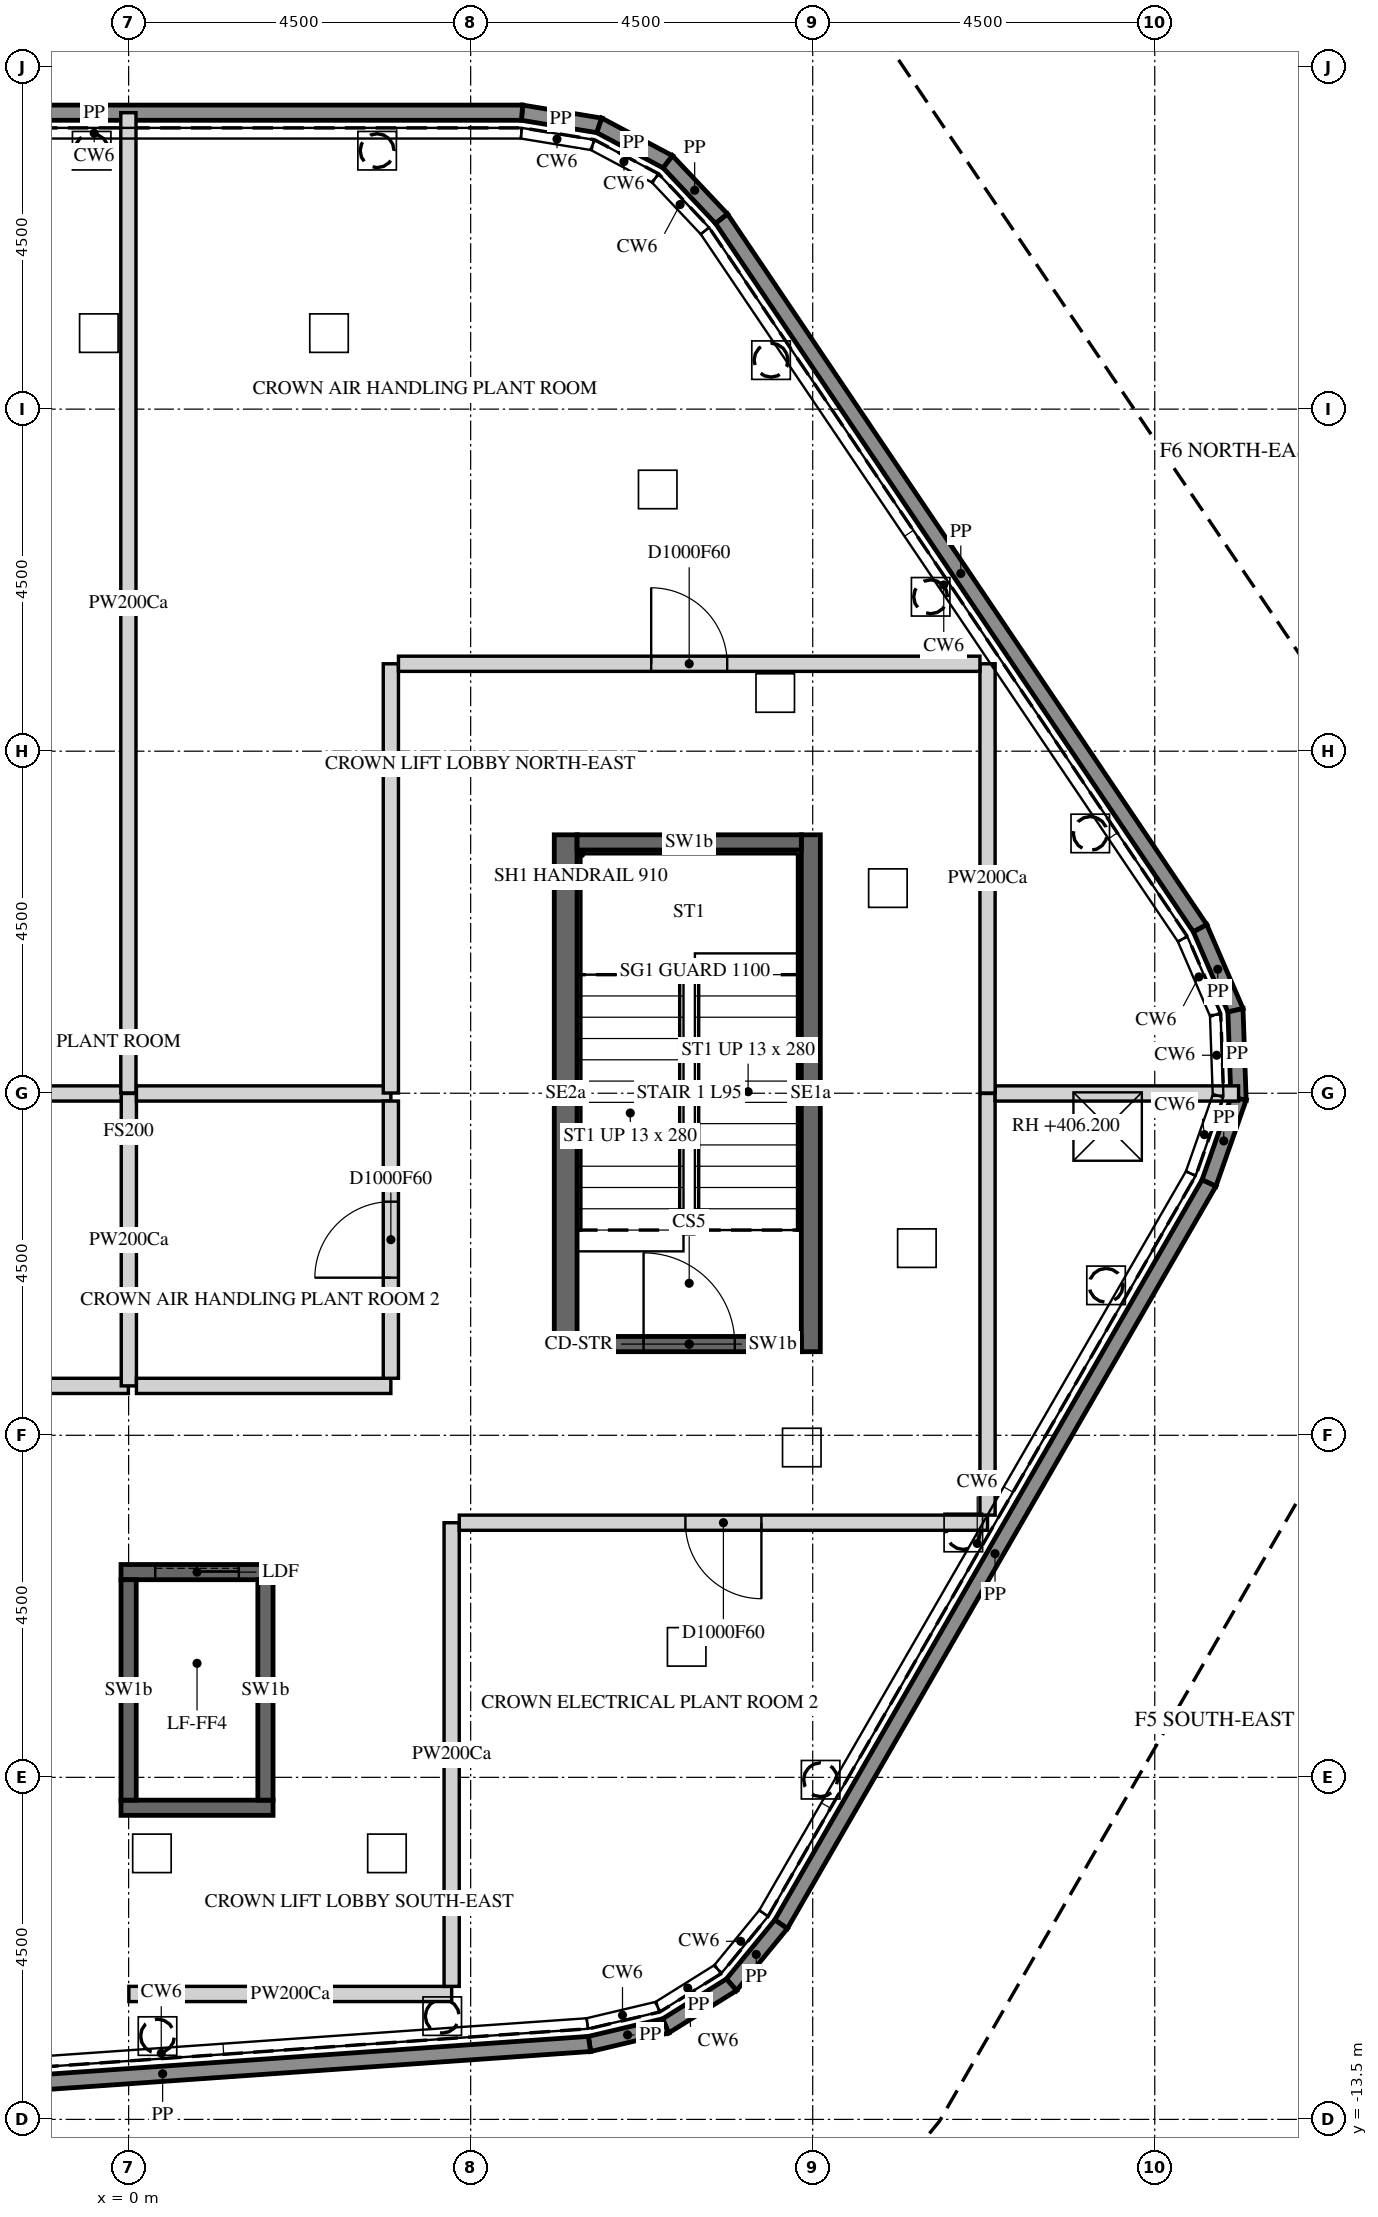
"""IFC4 building model, lengths in metres.
Left out: names, types, materials, properties, quantities, classifications, styles, units other than length and angle.
Written with IfcOpenShell. Run it as: python <this file> out.ifc"""

import sys

from ifc_helpers import new_model, si_unit, direction, frame, frame_2d, origin, origin_2d, place, context, subcontext, project, spatial, polyline, rectangle, outline, extrude, element, fill, save


model = new_model("IFC4")
c1 = context("Model", 3, precision=1e-05, world=origin(), true_north=direction((0.0, 1.0)))
c2 = subcontext(c1, "Body", "Model", "MODEL_VIEW")
j1 = project(units=[si_unit("LENGTHUNIT", "METRE"), si_unit("PLANEANGLEUNIT", "RADIAN")], contexts=[c1])
p1 = place(None, origin())
s1 = spatial("IfcSite", under=j1, at=p1, CompositionType="ELEMENT")
p2 = place(p1, origin())
s2 = spatial("IfcBuilding", under=s1, at=p2, CompositionType="ELEMENT")
p3 = place(p2, frame((0.0, 0.0, 401.7)))
s3 = spatial("IfcBuildingStorey", under=s2, at=p3, CompositionType="ELEMENT", Elevation=401.7)
p4 = place(p3, frame((5.176, 12.9, 4.5), z_axis=(0.0, 0.0, 1.0), x_axis=(0.986756818481, -0.162206600298, 0.0)))
e1 = element("IfcWall", 1, at=p4, inside=s3, PredefinedType="PARAPET", context=c2, shape_type="SweptSolid", body=[
    extrude(outline(polyline([(0.008, -0.1), (1.013, -0.1), (1.046, 0.1), (-0.008, 0.1), (0.008, -0.1)])), origin(), (0.0, 0.0, 1.0), 1.1),
])
p5 = place(p3, frame((6.192, 12.733, 4.5), z_axis=(0.0, 0.0, 1.0), x_axis=(0.883060001067, -0.469260092608, 0.0)))
e2 = element("IfcWall", 2, at=p5, inside=s3, PredefinedType="PARAPET", context=c2, shape_type="SweptSolid", body=[
    extrude(outline(polyline([(0.016, -0.1), (1.005, -0.1), (1.038, 0.1), (-0.016, 0.1), (0.016, -0.1)])), origin(), (0.0, 0.0, 1.0), 1.1),
])
p6 = place(p3, frame((7.094, 12.254, 4.5), z_axis=(0.0, 0.0, 1.0), x_axis=(0.686177819421, -0.727433845882, 0.0)))
e3 = element("IfcWall", 3, at=p6, inside=s3, PredefinedType="PARAPET", context=c2, shape_type="SweptSolid", body=[
    extrude(outline(polyline([(0.016, -0.1), (1.022, -0.1), (1.038, 0.1), (-0.016, 0.1), (0.016, -0.1)])), origin(), (0.0, 0.0, 1.0), 1.1),
])
p7 = place(p3, frame((7.8, 11.505, 4.5), z_axis=(0.0, 0.0, 1.0), x_axis=(0.559185688325, -0.829042439186, 0.0)))
e4 = element("IfcWall", 4, at=p7, inside=s3, PredefinedType="PARAPET", context=c2, shape_type="SweptSolid", body=[
    extrude(outline(polyline([(0.008, -0.1), (11.25, -0.1), (11.268, 0.1), (-0.008, 0.1), (0.008, -0.1)])), origin(), (0.0, 0.0, 1.0), 1.1),
])
p8 = place(p3, frame((14.096, 2.17, 4.5), z_axis=(0.0, 0.0, 1.0), x_axis=(0.396049889586, -0.918228993747, 0.0)))
e5 = element("IfcWall", 5, at=p8, inside=s3, PredefinedType="PARAPET", context=c2, shape_type="SweptSolid", body=[
    extrude(outline(polyline([(0.009, -0.1), (1.156, -0.1), (1.194, 0.1), (-0.009, 0.1), (0.009, -0.1)])), origin(), (0.0, 0.0, 1.0), 1.1),
])
p9 = place(p3, frame((14.562, 1.092, 4.5), z_axis=(0.0, 0.0, 1.0), x_axis=(0.034981720402, -0.999387952318, 0.0)))
e6 = element("IfcWall", 6, at=p9, inside=s3, PredefinedType="PARAPET", context=c2, shape_type="SweptSolid", body=[
    extrude(outline(polyline([(0.019, -0.1), (1.147, -0.1), (1.184, 0.1), (-0.019, 0.1), (0.019, -0.1)])), origin(), (0.0, 0.0, 1.0), 1.1),
])
p10 = place(p3, frame((14.602, -0.073, 4.5), z_axis=(0.0, 0.0, 1.0), x_axis=(-0.331026038484, -0.94362162006, 0.0)))
e7 = element("IfcWall", 7, at=p10, inside=s3, PredefinedType="PARAPET", context=c2, shape_type="SweptSolid", body=[
    extrude(outline(polyline([(0.019, -0.1), (1.166, -0.1), (1.184, 0.1), (-0.019, 0.1), (0.019, -0.1)])), origin(), (0.0, 0.0, 1.0), 1.1),
])
p11 = place(p3, frame((14.213, -1.182, 4.5), z_axis=(0.0, 0.0, 1.0), x_axis=(-0.500003376122, -0.866023454571, 0.0)))
e8 = element("IfcWall", 8, at=p11, inside=s3, PredefinedType="PARAPET", context=c2, shape_type="SweptSolid", body=[
    extrude(outline(polyline([(0.009, -0.1), (11.251, -0.1), (11.267, 0.1), (-0.009, 0.1), (0.009, -0.1)])), origin(), (0.0, 0.0, 1.0), 1.1),
])
p12 = place(p3, frame((8.584, -10.933, 4.5), z_axis=(0.0, 0.0, 1.0), x_axis=(-0.63381867035, -0.773481669541, 0.0)))
e9 = element("IfcWall", 9, at=p12, inside=s3, PredefinedType="PARAPET", context=c2, shape_type="SweptSolid", body=[
    extrude(outline(polyline([(0.008, -0.1), (1.013, -0.1), (1.046, 0.1), (-0.008, 0.1), (0.008, -0.1)])), origin(), (0.0, 0.0, 1.0), 1.1),
])
p13 = place(p3, frame((7.931, -11.729, 4.5), z_axis=(0.0, 0.0, 1.0), x_axis=(-0.84815942401, -0.529741060768, 0.0)))
e10 = element("IfcWall", 10, at=p13, inside=s3, PredefinedType="PARAPET", context=c2, shape_type="SweptSolid", body=[
    extrude(outline(polyline([(0.016, -0.1), (1.005, -0.1), (1.038, 0.1), (-0.016, 0.1), (0.016, -0.1)])), origin(), (0.0, 0.0, 1.0), 1.1),
])
p14 = place(p3, frame((7.065, -12.27, 4.5), z_axis=(0.0, 0.0, 1.0), x_axis=(-0.973014468698, -0.230744108711, 0.0)))
e11 = element("IfcWall", 11, at=p14, inside=s3, PredefinedType="PARAPET", context=c2, shape_type="SweptSolid", body=[
    extrude(outline(polyline([(0.016, -0.1), (1.021, -0.1), (1.038, 0.1), (-0.016, 0.1), (0.016, -0.1)])), origin(), (0.0, 0.0, 1.0), 1.1),
])
p15 = place(p3, frame((6.063, -12.508, 4.5), z_axis=(0.0, 0.0, 1.0), x_axis=(-0.997564024583, -0.069756840932, 0.0)))
e12 = element("IfcWall", 12, at=p15, inside=s3, PredefinedType="PARAPET", context=c2, shape_type="SweptSolid", body=[
    extrude(outline(polyline([(0.008, -0.1), (11.25, -0.1), (11.268, 0.1), (-0.008, 0.1), (0.008, -0.1)])), origin(), (0.0, 0.0, 1.0), 1.1),
])
p16 = place(p3, frame((-6.083, 12.9, 4.5), z_axis=(0.0, 0.0, 1.0), x_axis=(1.0, 0.0, 0.0)))
e13 = element("IfcWall", 13, at=p16, inside=s3, PredefinedType="PARAPET", context=c2, shape_type="SweptSolid", body=[
    extrude(outline(polyline([(0.009, -0.1), (11.251, -0.1), (11.267, 0.1), (-0.009, 0.1), (0.009, -0.1)])), origin(), (0.0, 0.0, 1.0), 1.1),
])
p17 = place(p3, frame((-0.1, -6.3, -0.2), z_axis=(0.0, 0.0, 1.0), x_axis=(1.0, 0.0, 0.0)))
e14 = element("IfcWall", 14, at=p17, inside=s3, PredefinedType="SHEAR", context=c2, shape_type="SweptSolid", body=[
    extrude(rectangle(XDim=2.0, YDim=0.2, at=frame_2d((1.0, 0.0))), origin(), (0.0, 0.0, 1.0), 4.5),
])
p18 = place(p17, frame((0.45, 0.0, 0.2)))
e15 = element("IfcOpeningElement", 15, at=p18, cuts=e14, PredefinedType="OPENING", context=c2, shape_type="SweptSolid", body=[
    extrude(rectangle(XDim=1.1, YDim=2.1, at=frame_2d((0.55, 1.05))), frame((0.0, 0.11, 0.0), z_axis=(0.0, -1.0, 0.0), x_axis=(1.0, 0.0, 0.0)), (0.0, 0.0, 1.0), 0.22),
])
p19 = place(p3, frame((-0.1, -9.4, -0.2), z_axis=(0.0, 0.0, 1.0), x_axis=(1.0, 0.0, 0.0)))
e16 = element("IfcWall", 16, at=p19, inside=s3, PredefinedType="SHEAR", context=c2, shape_type="SweptSolid", body=[
    extrude(rectangle(XDim=2.0, YDim=0.2, at=frame_2d((1.0, 0.0))), origin(), (0.0, 0.0, 1.0), 4.5),
])
for number, where, z_axis, x_axis in (
    (17, (0.0, -9.3, -0.2), (0.0, 0.0, 1.0), (0.0, 1.0, 0.0)),
    (18, (1.8, -9.3, -0.2), (0.0, 0.0, 1.0), (0.0, 1.0, 0.0)),
):
    element("IfcWall", number, at=place(p3, frame(where, z_axis=z_axis, x_axis=x_axis)), inside=s3, PredefinedType="SHEAR", context=c2, shape_type="SweptSolid", body=[
        extrude(rectangle(XDim=2.9, YDim=0.2, at=frame_2d((1.45, 0.0))), origin(), (0.0, 0.0, 1.0), 4.5),
    ])
p20 = place(p3, frame((5.75, -3.4, -0.2), z_axis=(0.0, 0.0, 1.0), x_axis=(0.0, 1.0, 0.0)))
e19 = element("IfcWall", 19, at=p20, inside=s3, PredefinedType="SHEAR", context=c2, shape_type="SweptSolid", body=[
    extrude(rectangle(XDim=6.8, YDim=0.3, at=frame_2d((3.4, 0.0))), origin(), (0.0, 0.0, 1.0), 4.5),
])
p21 = place(p3, frame((8.975, -3.4, -0.2), z_axis=(0.0, 0.0, 1.0), x_axis=(0.0, 1.0, 0.0)))
e20 = element("IfcWall", 20, at=p21, inside=s3, PredefinedType="SHEAR", context=c2, shape_type="SweptSolid", body=[
    extrude(rectangle(XDim=6.8, YDim=0.25, at=frame_2d((3.4, 0.0))), origin(), (0.0, 0.0, 1.0), 4.5),
])
p22 = place(p3, frame((5.9, 3.3, -0.2), z_axis=(0.0, 0.0, 1.0), x_axis=(1.0, 0.0, 0.0)))
e21 = element("IfcWall", 21, at=p22, inside=s3, PredefinedType="SHEAR", context=c2, shape_type="SweptSolid", body=[
    extrude(rectangle(XDim=2.95, YDim=0.2, at=frame_2d((1.475, 0.0))), origin(), (0.0, 0.0, 1.0), 4.5),
])
p23 = place(p3, frame((5.9, -3.3, -0.2), z_axis=(0.0, 0.0, 1.0), x_axis=(1.0, 0.0, 0.0)))
e22 = element("IfcWall", 22, at=p23, inside=s3, PredefinedType="SHEAR", context=c2, shape_type="SweptSolid", body=[
    extrude(rectangle(XDim=2.95, YDim=0.2, at=frame_2d((1.475, 0.0))), origin(), (0.0, 0.0, 1.0), 4.5),
])
p24 = place(p23, frame((0.875, 0.0, 0.2)))
e23 = element("IfcOpeningElement", 23, at=p24, cuts=e22, PredefinedType="OPENING", context=c2, shape_type="SweptSolid", body=[
    extrude(rectangle(XDim=1.2, YDim=2.4, at=frame_2d((0.6, 1.2))), frame((0.0, 0.11, 0.0), z_axis=(0.0, -1.0, 0.0), x_axis=(1.0, 0.0, 0.0)), (0.0, 0.0, 1.0), 0.22),
])
for number, where, z_axis, x_axis in (
    (24, (-3.35, -0.003, 0.0), (0.0, 0.0, 1.0), (1.0, 0.0, 0.0)),
    (25, (-0.003, -3.85, 0.0), (0.0, 0.0, 1.0), (-1.0, 0.0, 0.0)),
):
    element("IfcWall", number, at=place(p3, frame(where, z_axis=z_axis, x_axis=x_axis)), inside=s3, PredefinedType="PARTITIONING", context=c2, shape_type="SweptSolid", body=[
        extrude(rectangle(XDim=3.347, YDim=0.2, at=frame_2d((1.674, 0.0))), origin(), (0.0, 0.0, 1.0), 4.3),
    ])
p25 = place(p3, frame((-0.003, 12.9, 0.0), z_axis=(0.0, 0.0, 1.0), x_axis=(0.0, -1.0, 0.0)))
e26 = element("IfcWall", 26, at=p25, inside=s3, PredefinedType="PARTITIONING", context=c2, shape_type="SweptSolid", body=[
    extrude(rectangle(XDim=12.897, YDim=0.2, at=frame_2d((6.448, 0.0))), origin(), (0.0, 0.0, 1.0), 4.3),
])
p26 = place(p3, frame((0.003, -11.85, 0.0), z_axis=(0.0, 0.0, 1.0), x_axis=(1.0, 0.0, 0.0)))
e27 = element("IfcWall", 27, at=p26, inside=s3, PredefinedType="PARTITIONING", context=c2, shape_type="SweptSolid", body=[
    extrude(rectangle(XDim=4.247, YDim=0.2, at=frame_2d((2.124, 0.0))), origin(), (0.0, 0.0, 1.0), 4.3),
])
p27 = place(p3, frame((0.003, -3.85, 0.0), z_axis=(0.0, 0.0, 1.0), x_axis=(0.0, 1.0, 0.0)))
e28 = element("IfcWall", 28, at=p27, inside=s3, PredefinedType="PARTITIONING", context=c2, shape_type="SweptSolid", body=[
    extrude(rectangle(XDim=3.847, YDim=0.2, at=frame_2d((1.924, 0.0))), origin(), (0.0, 0.0, 1.0), 4.3),
])
for number, where, z_axis, x_axis in (
    (29, (0.103, -0.003, 0.0), (0.0, 0.0, 1.0), (1.0, 0.0, 0.0)),
    (30, (3.45, -3.85, 0.0), (0.0, 0.0, 1.0), (-1.0, 0.0, 0.0)),
):
    element("IfcWall", number, at=place(p3, frame(where, z_axis=z_axis, x_axis=x_axis)), inside=s3, PredefinedType="PARTITIONING", context=c2, shape_type="SweptSolid", body=[
        extrude(rectangle(XDim=3.347, YDim=0.2, at=frame_2d((1.673, 0.0))), origin(), (0.0, 0.0, 1.0), 4.3),
    ])
p28 = place(p3, frame((3.45, -3.75, 0.0), z_axis=(0.0, 0.0, 1.0), x_axis=(0.0, 1.0, 0.0)))
e31 = element("IfcWall", 31, at=p28, inside=s3, PredefinedType="PARTITIONING", context=c2, shape_type="SweptSolid", body=[
    extrude(rectangle(XDim=3.647, YDim=0.2, at=frame_2d((1.823, 0.0))), origin(), (0.0, 0.0, 1.0), 4.3),
])
p29 = place(p28, frame((1.323, 0.0, 0.0)))
e32 = element("IfcOpeningElement", 32, at=p29, cuts=e31, PredefinedType="OPENING", context=c2, shape_type="SweptSolid", body=[
    extrude(rectangle(XDim=1.0, YDim=2.1, at=frame_2d((0.5, 1.05))), frame((0.0, 0.11, 0.0), z_axis=(0.0, -1.0, 0.0), x_axis=(1.0, 0.0, 0.0)), (0.0, 0.0, 1.0), 0.22),
])
p30 = place(p3, frame((3.45, 5.65, 0.0), z_axis=(0.0, 0.0, 1.0), x_axis=(0.0, -1.0, 0.0)))
e33 = element("IfcWall", 33, at=p30, inside=s3, PredefinedType="PARTITIONING", context=c2, shape_type="SweptSolid", body=[
    extrude(rectangle(XDim=5.647, YDim=0.2, at=frame_2d((2.823, 0.0))), origin(), (0.0, 0.0, 1.0), 4.3),
])
p31 = place(p3, frame((4.25, -11.75, 0.0), z_axis=(0.0, 0.0, 1.0), x_axis=(0.0, 1.0, 0.0)))
e34 = element("IfcWall", 34, at=p31, inside=s3, PredefinedType="PARTITIONING", context=c2, shape_type="SweptSolid", body=[
    extrude(rectangle(XDim=6.1, YDim=0.2, at=frame_2d((3.05, 0.0))), origin(), (0.0, 0.0, 1.0), 4.3),
])
p32 = place(p3, frame((11.3, -5.65, 0.0), z_axis=(0.0, 0.0, 1.0), x_axis=(-1.0, 0.0, 0.0)))
e35 = element("IfcWall", 35, at=p32, inside=s3, PredefinedType="PARTITIONING", context=c2, shape_type="SweptSolid", body=[
    extrude(rectangle(XDim=6.95, YDim=0.2, at=frame_2d((3.475, 0.0))), origin(), (0.0, 0.0, 1.0), 4.3),
])
p33 = place(p32, frame((2.975, 0.0, 0.0)))
e36 = element("IfcOpeningElement", 36, at=p33, cuts=e35, PredefinedType="OPENING", context=c2, shape_type="SweptSolid", body=[
    extrude(rectangle(XDim=1.0, YDim=2.1, at=frame_2d((0.5, 1.05))), frame((0.0, 0.11, 0.0), z_axis=(0.0, -1.0, 0.0), x_axis=(1.0, 0.0, 0.0)), (0.0, 0.0, 1.0), 0.22),
])
p34 = place(p3, frame((11.3, -5.55, 0.0), z_axis=(0.0, 0.0, 1.0), x_axis=(0.0, 1.0, 0.0)))
e37 = element("IfcWall", 37, at=p34, inside=s3, PredefinedType="PARTITIONING", context=c2, shape_type="SweptSolid", body=[
    extrude(rectangle(XDim=5.547, YDim=0.2, at=frame_2d((2.773, 0.0))), origin(), (0.0, 0.0, 1.0), 4.3),
])
p35 = place(p3, frame((11.4, -0.003, 0.0), z_axis=(0.0, 0.0, 1.0), x_axis=(1.0, 0.0, 0.0)))
e38 = element("IfcWall", 38, at=p35, inside=s3, PredefinedType="PARTITIONING", context=c2, shape_type="SweptSolid", body=[
    extrude(rectangle(XDim=3.203, YDim=0.2, at=frame_2d((1.602, 0.0))), origin(), (0.0, 0.0, 1.0), 4.3),
])
p36 = place(p3, frame((11.3, 0.003, 0.0), z_axis=(0.0, 0.0, 1.0), x_axis=(0.0, 1.0, 0.0)))
e39 = element("IfcWall", 39, at=p36, inside=s3, PredefinedType="PARTITIONING", context=c2, shape_type="SweptSolid", body=[
    extrude(rectangle(XDim=5.647, YDim=0.2, at=frame_2d((2.823, 0.0))), origin(), (0.0, 0.0, 1.0), 4.3),
])
p37 = place(p3, frame((3.55, 5.65, 0.0), z_axis=(0.0, 0.0, 1.0), x_axis=(1.0, 0.0, 0.0)))
e40 = element("IfcWall", 40, at=p37, inside=s3, PredefinedType="PARTITIONING", context=c2, shape_type="SweptSolid", body=[
    extrude(rectangle(XDim=7.65, YDim=0.2, at=frame_2d((3.825, 0.0))), origin(), (0.0, 0.0, 1.0), 4.3),
])
p38 = place(p37, frame((3.325, 0.0, 0.0)))
e41 = element("IfcOpeningElement", 41, at=p38, cuts=e40, PredefinedType="OPENING", context=c2, shape_type="SweptSolid", body=[
    extrude(rectangle(XDim=1.0, YDim=2.1, at=frame_2d((0.5, 1.05))), frame((0.0, 0.11, 0.0), z_axis=(0.0, -1.0, 0.0), x_axis=(1.0, 0.0, 0.0)), (0.0, 0.0, 1.0), 0.22),
])
p39 = place(p2, frame((0.0, 0.0, 406.2)))
p40 = place(p39, frame((0.0, 0.0, -0.2)))
p41 = place(p40, frame((12.88, -0.438, 0.0)))
p42 = place(p41, frame((0.0, 0.0, 0.15)))
e42 = element("IfcDoor", 42, at=p42, inside=s3, OperationType="SINGLE_SWING_LEFT", PredefinedType="TRAPDOOR", context=c2, shape_type="SweptSolid", body=[
    extrude(rectangle(XDim=0.9, YDim=0.9, at=origin_2d()), origin(), (0.0, 0.0, 1.0), 0.05),
])
p43 = place(p24, origin())
e43 = element("IfcDoor", 43, at=p43, inside=s3, OperationType="SINGLE_SWING_LEFT", PredefinedType="DOOR", context=c2, shape_type="SweptSolid", body=[
    extrude(rectangle(XDim=1.2, YDim=2.4, at=frame_2d((0.6, 1.2))), frame((0.0, 0.025, 0.0), z_axis=(0.0, -1.0, 0.0), x_axis=(1.0, 0.0, 0.0)), (0.0, 0.0, 1.0), 0.05),
])
fill(e23, e43)
p44 = place(p18, origin())
e44 = element("IfcDoor", 44, at=p44, inside=s3, OperationType="SLIDING_TO_LEFT", PredefinedType="DOOR", context=c2, shape_type="SweptSolid", body=[
    extrude(rectangle(XDim=1.1, YDim=2.1, at=frame_2d((0.55, 1.05))), frame((0.0, 0.025, 0.0), z_axis=(0.0, -1.0, 0.0), x_axis=(1.0, 0.0, 0.0)), (0.0, 0.0, 1.0), 0.05),
])
fill(e15, e44)
p45 = place(p29, origin())
e45 = element("IfcDoor", 45, at=p45, inside=s3, OperationType="SINGLE_SWING_LEFT", PredefinedType="DOOR", context=c2, shape_type="SweptSolid", body=[
    extrude(rectangle(XDim=1.0, YDim=2.1, at=frame_2d((0.5, 1.05))), frame((0.0, 0.025, 0.0), z_axis=(0.0, -1.0, 0.0), x_axis=(1.0, 0.0, 0.0)), (0.0, 0.0, 1.0), 0.05),
])
fill(e32, e45)
p46 = place(p33, origin())
e46 = element("IfcDoor", 46, at=p46, inside=s3, OperationType="SINGLE_SWING_RIGHT", PredefinedType="DOOR", context=c2, shape_type="SweptSolid", body=[
    extrude(rectangle(XDim=1.0, YDim=2.1, at=frame_2d((0.5, 1.05))), frame((0.0, 0.025, 0.0), z_axis=(0.0, -1.0, 0.0), x_axis=(1.0, 0.0, 0.0)), (0.0, 0.0, 1.0), 0.05),
])
fill(e36, e46)
p47 = place(p38, origin())
e47 = element("IfcDoor", 47, at=p47, inside=s3, OperationType="SINGLE_SWING_LEFT", PredefinedType="DOOR", context=c2, shape_type="SweptSolid", body=[
    extrude(rectangle(XDim=1.0, YDim=2.1, at=frame_2d((0.5, 1.05))), frame((0.0, 0.025, 0.0), z_axis=(0.0, -1.0, 0.0), x_axis=(1.0, 0.0, 0.0)), (0.0, 0.0, 1.0), 0.05),
])
fill(e41, e47)
save(model, sys.argv[1])
